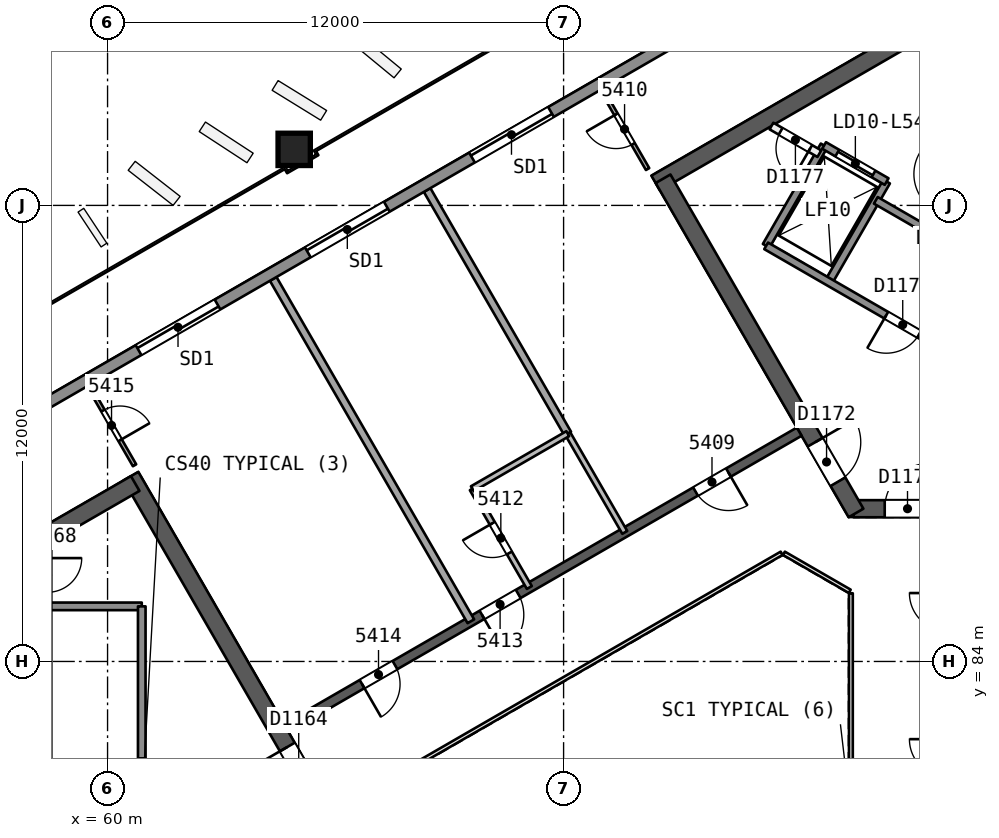
"""IFC4 building model, lengths in metres.
Left out: names, types, materials, properties, quantities, classifications, styles, units other than length and angle.
Written with IfcOpenShell. Run it as: python <this file> out.ifc"""

import sys

from ifc_helpers import new_model, si_unit, direction, frame, frame_2d, origin, origin_2d, place, context, subcontext, project, spatial, rectangle, extrude, element, fill, save


model = new_model("IFC4")
c1 = context("Model", 3, precision=1e-05, world=origin(), true_north=direction((0.0, 1.0)))
c2 = subcontext(c1, "Body", "Model", "MODEL_VIEW")
j1 = project(units=[si_unit("LENGTHUNIT", "METRE"), si_unit("PLANEANGLEUNIT", "RADIAN")], contexts=[c1])
p1 = place(None, origin())
s1 = spatial("IfcSite", under=j1, at=p1, CompositionType="ELEMENT")
p2 = place(p1, origin())
s2 = spatial("IfcBuilding", under=s1, at=p2, CompositionType="ELEMENT")
p3 = place(p2, frame((0.0, 0.0, 220.6)))
s3 = spatial("IfcBuildingStorey", under=s2, at=p3, CompositionType="ELEMENT", Elevation=220.6)
p4 = place(p3, frame((65.74, 80.0, 0.0), z_axis=(0.0, 0.0, 1.0), x_axis=(-0.499991857942, 0.866030104553, 0.0)))
e1 = element("IfcWall", 1, at=p4, inside=s3, PredefinedType="SHEAR", context=c2, shape_type="SweptSolid", body=[
    extrude(rectangle(XDim=10.25, YDim=0.45, at=frame_2d((5.125, 0.0))), origin(), (0.0, 0.0, 1.0), 3.7),
])
p5 = place(p4, frame((0.82, 0.0, 0.0)))
e2 = element("IfcOpeningElement", 2, at=p5, cuts=e1, PredefinedType="OPENING", context=c2, shape_type="SweptSolid", body=[
    extrude(rectangle(XDim=1.2, YDim=2.1, at=frame_2d((0.6, 1.05))), frame((0.0, 0.235, 0.0), z_axis=(0.0, -1.0, 0.0), x_axis=(1.0, 0.0, 0.0)), (0.0, 0.0, 1.0), 0.471),
])
p6 = place(p3, frame((60.728, 88.682, 0.0), z_axis=(0.0, 0.0, 1.0), x_axis=(-0.866021613849, -0.500006564303, 0.0)))
e3 = element("IfcWall", 3, at=p6, inside=s3, PredefinedType="SHEAR", context=c2, shape_type="SweptSolid", body=[
    extrude(rectangle(XDim=14.108, YDim=0.45, at=frame_2d((7.054, 0.0))), origin(), (0.0, 0.0, 1.0), 3.7),
])
p7 = place(p3, frame((79.63, 88.019, 0.0), z_axis=(0.0, 0.0, 1.0), x_axis=(1.0, 0.0, 0.0)))
e4 = element("IfcWall", 4, at=p7, inside=s3, PredefinedType="SHEAR", context=c2, shape_type="SweptSolid", body=[
    extrude(rectangle(XDim=10.25, YDim=0.45, at=frame_2d((5.125, 0.0))), origin(), (0.0, 0.0, 1.0), 3.7),
])
p8 = place(p7, frame((0.82, 0.0, 0.0)))
e5 = element("IfcOpeningElement", 5, at=p8, cuts=e4, PredefinedType="OPENING", context=c2, shape_type="SweptSolid", body=[
    extrude(rectangle(XDim=1.2, YDim=2.1, at=frame_2d((0.6, 1.05))), frame((0.0, 0.235, 0.0), z_axis=(0.0, -1.0, 0.0), x_axis=(1.0, 0.0, 0.0)), (0.0, 0.0, 1.0), 0.471),
])
p9 = place(p3, frame((86.723, 103.69, 0.0), z_axis=(0.0, 0.0, 1.0), x_axis=(-0.866022713978, -0.500004658852, 0.0)))
e6 = element("IfcWall", 6, at=p9, inside=s3, PredefinedType="SHEAR", context=c2, shape_type="SweptSolid", body=[
    extrude(rectangle(XDim=14.203, YDim=0.45, at=frame_2d((7.102, 0.0))), origin(), (0.0, 0.0, 1.0), 3.7),
])
p10 = place(p3, frame((74.617, 96.701, 0.0), z_axis=(0.0, 0.0, 1.0), x_axis=(0.499994385119, -0.866028645513, 0.0)))
e7 = element("IfcWall", 7, at=p10, inside=s3, PredefinedType="SHEAR", context=c2, shape_type="SweptSolid", body=[
    extrude(rectangle(XDim=10.155, YDim=0.45, at=frame_2d((5.077, 0.0))), origin(), (0.0, 0.0, 1.0), 3.7),
])
p11 = place(p10, frame((8.005, 0.0, 0.0)))
e8 = element("IfcOpeningElement", 8, at=p11, cuts=e7, PredefinedType="OPENING", context=c2, shape_type="SweptSolid", body=[
    extrude(rectangle(XDim=1.2, YDim=2.1, at=frame_2d((0.6, 1.05))), frame((0.0, 0.235, 0.0), z_axis=(0.0, -1.0, 0.0), x_axis=(1.0, 0.0, 0.0)), (0.0, 0.0, 1.0), 0.471),
])
p12 = place(p3, frame((78.2, 90.046, 0.0), z_axis=(0.0, 0.0, 1.0), x_axis=(-0.866026492143, -0.499998114903, 0.0)))
e9 = element("IfcWall", 9, at=p12, inside=s3, PredefinedType="SHEAR", context=c2, shape_type="SweptSolid", body=[
    extrude(rectangle(XDim=15.588, YDim=0.25, at=frame_2d((7.794, 0.0))), origin(), (0.0, 0.0, 1.0), 3.3),
])
p13 = place(p12, frame((2.15, 0.0, 0.0)))
e10 = element("IfcOpeningElement", 10, at=p13, cuts=e9, PredefinedType="OPENING", context=c2, shape_type="SweptSolid", body=[
    extrude(rectangle(XDim=1.0, YDim=2.1, at=frame_2d((0.5, 1.05))), frame((0.0, 0.135, 0.0), z_axis=(0.0, -1.0, 0.0), x_axis=(1.0, 0.0, 0.0)), (0.0, 0.0, 1.0), 0.271),
])
p14 = place(p12, frame((8.538, 0.0, 0.0)))
e11 = element("IfcOpeningElement", 11, at=p14, cuts=e9, PredefinedType="OPENING", context=c2, shape_type="SweptSolid", body=[
    extrude(rectangle(XDim=1.1, YDim=2.1, at=frame_2d((0.55, 1.05))), frame((0.0, 0.135, 0.0), z_axis=(0.0, -1.0, 0.0), x_axis=(1.0, 0.0, 0.0)), (0.0, 0.0, 1.0), 0.271),
])
p15 = place(p12, frame((12.282, 0.0, 0.0)))
e12 = element("IfcOpeningElement", 12, at=p15, cuts=e9, PredefinedType="OPENING", context=c2, shape_type="SweptSolid", body=[
    extrude(rectangle(XDim=1.0, YDim=2.1, at=frame_2d((0.5, 1.05))), frame((0.0, 0.135, 0.0), z_axis=(0.0, -1.0, 0.0), x_axis=(1.0, 0.0, 0.0)), (0.0, 0.0, 1.0), 0.271),
])
p16 = place(p3, frame((64.899, 97.495, 0.0), z_axis=(0.010093620709, -0.017482414954, 0.999796221231), x_axis=(-0.499897086036, 0.865849517735, 0.020187025824)))
e13 = element("IfcColumn", 13, at=p16, inside=s3, PredefinedType="COLUMN", context=c2, shape_type="SweptSolid", body=[
    extrude(rectangle(XDim=0.85, YDim=0.85, at=origin_2d()), origin(), (0.0, 0.0, 1.0), 3.701),
])
p17 = place(p3, frame((74.21, 96.956, 0.0), z_axis=(0.0, 0.0, 1.0), x_axis=(-0.49995203611, 0.866053093978, 0.0)))
e14 = element("IfcWall", 14, at=p17, inside=s3, PredefinedType="PARTITIONING", context=c2, shape_type="SweptSolid", body=[
    extrude(rectangle(XDim=2.424, YDim=0.1, at=frame_2d((1.212, 0.0))), origin(), (0.0, 0.0, 1.0), 3.3),
])
p18 = place(p17, frame((0.762, 0.0, 0.0)))
e15 = element("IfcOpeningElement", 15, at=p18, cuts=e14, PredefinedType="OPENING", context=c2, shape_type="SweptSolid", body=[
    extrude(rectangle(XDim=0.9, YDim=2.1, at=frame_2d((0.45, 1.05))), frame((0.0, 0.061, 0.0), z_axis=(0.0, -1.0, 0.0), x_axis=(1.0, 0.0, 0.0)), (0.0, 0.0, 1.0), 0.121),
])
p19 = place(p3, frame((68.408, 96.405, 0.0), z_axis=(0.0, 0.0, 1.0), x_axis=(0.500019340035, -0.866014237522, 0.0)))
e16 = element("IfcWall", 16, at=p19, inside=s3, PredefinedType="PARTITIONING", context=c2, shape_type="SweptSolid", body=[
    extrude(rectangle(XDim=7.403, YDim=0.2, at=frame_2d((3.702, 0.0))), origin(), (0.0, 0.0, 1.0), 3.3),
])
p20 = place(p3, frame((72.11, 89.994, 0.0), z_axis=(0.0, 0.0, 1.0), x_axis=(0.499990139034, -0.866031096941, 0.0)))
e17 = element("IfcWall", 17, at=p20, inside=s3, PredefinedType="PARTITIONING", context=c2, shape_type="SweptSolid", body=[
    extrude(rectangle(XDim=3.0, YDim=0.15, at=frame_2d((1.5, 0.0))), origin(), (0.0, 0.0, 1.0), 3.3),
])
p21 = place(p3, frame((71.099, 85.946, 0.0), z_axis=(0.0, 0.0, 1.0), x_axis=(-0.499990139034, 0.866031096941, 0.0)))
e18 = element("IfcWall", 18, at=p21, inside=s3, PredefinedType="PARTITIONING", context=c2, shape_type="SweptSolid", body=[
    extrude(rectangle(XDim=3.0, YDim=0.15, at=frame_2d((1.5, 0.0))), origin(), (0.0, 0.0, 1.0), 3.3),
])
p22 = place(p21, frame((1.05, 0.0, 0.0)))
e19 = element("IfcOpeningElement", 19, at=p22, cuts=e18, PredefinedType="OPENING", context=c2, shape_type="SweptSolid", body=[
    extrude(rectangle(XDim=0.9, YDim=2.1, at=frame_2d((0.45, 1.05))), frame((0.0, 0.085, 0.0), z_axis=(0.0, -1.0, 0.0), x_axis=(1.0, 0.0, 0.0)), (0.0, 0.0, 1.0), 0.171),
])
p23 = place(p3, frame((69.599, 88.544, 0.0), z_axis=(0.0, 0.0, 1.0), x_axis=(0.866032775405, 0.499987231761, 0.0)))
e20 = element("IfcWall", 20, at=p23, inside=s3, PredefinedType="PARTITIONING", context=c2, shape_type="SweptSolid", body=[
    extrude(rectangle(XDim=2.9, YDim=0.15, at=frame_2d((1.45, 0.0))), origin(), (0.0, 0.0, 1.0), 3.3),
])
p24 = place(p3, frame((64.358, 94.067, 0.0), z_axis=(0.0, 0.0, 1.0), x_axis=(0.500010919066, -0.866019099567, 0.0)))
e21 = element("IfcWall", 21, at=p24, inside=s3, PredefinedType="PARTITIONING", context=c2, shape_type="SweptSolid", body=[
    extrude(rectangle(XDim=10.403, YDim=0.2, at=frame_2d((5.202, 0.0))), origin(), (0.0, 0.0, 1.0), 3.3),
])
p25 = place(p3, frame((59.499, 91.261, 0.0), z_axis=(0.0, 0.0, 1.0), x_axis=(0.49995203611, -0.866053093978, 0.0)))
e22 = element("IfcWall", 22, at=p25, inside=s3, PredefinedType="PARTITIONING", context=c2, shape_type="SweptSolid", body=[
    extrude(rectangle(XDim=2.424, YDim=0.1, at=frame_2d((1.212, 0.0))), origin(), (0.0, 0.0, 1.0), 3.3),
])
p26 = place(p25, frame((0.762, 0.0, 0.0)))
e23 = element("IfcOpeningElement", 23, at=p26, cuts=e22, PredefinedType="OPENING", context=c2, shape_type="SweptSolid", body=[
    extrude(rectangle(XDim=0.9, YDim=2.1, at=frame_2d((0.45, 1.05))), frame((0.0, 0.061, 0.0), z_axis=(0.0, -1.0, 0.0), x_axis=(1.0, 0.0, 0.0)), (0.0, 0.0, 1.0), 0.121),
])
p27 = place(p3, frame((44.193, 82.596, 0.0), z_axis=(0.0, 0.0, 1.0), x_axis=(0.866024521231, 0.500001528624, 0.0)))
e24 = element("IfcWall", 24, at=p27, inside=s3, PredefinedType="SOLIDWALL", context=c2, shape_type="SweptSolid", body=[
    extrude(rectangle(XDim=50.762, YDim=0.3, at=frame_2d((25.381, 0.0))), origin(), (0.0, 0.0, 1.0), 3.3),
])
p28 = place(p27, frame((24.337, 0.0, 0.0)))
e25 = element("IfcOpeningElement", 25, at=p28, cuts=e24, PredefinedType="OPENING", context=c2, shape_type="SweptSolid", body=[
    extrude(rectangle(XDim=2.4, YDim=2.4, at=frame_2d((1.2, 1.2))), frame((0.0, 0.161, 0.0), z_axis=(0.0, -1.0, 0.0), x_axis=(1.0, 0.0, 0.0)), (0.0, 0.0, 1.0), 0.321),
])
p29 = place(p27, frame((29.325, 0.0, 0.0)))
e26 = element("IfcOpeningElement", 26, at=p29, cuts=e24, PredefinedType="OPENING", context=c2, shape_type="SweptSolid", body=[
    extrude(rectangle(XDim=2.4, YDim=2.4, at=frame_2d((1.2, 1.2))), frame((0.0, 0.161, 0.0), z_axis=(0.0, -1.0, 0.0), x_axis=(1.0, 0.0, 0.0)), (0.0, 0.0, 1.0), 0.321),
])
p30 = place(p27, frame((39.492, 0.0, 0.0)))
e27 = element("IfcOpeningElement", 27, at=p30, cuts=e24, PredefinedType="OPENING", context=c2, shape_type="SweptSolid", body=[
    extrude(rectangle(XDim=2.4, YDim=2.4, at=frame_2d((1.2, 1.2))), frame((0.0, 0.161, 0.0), z_axis=(0.0, -1.0, 0.0), x_axis=(1.0, 0.0, 0.0)), (0.0, 0.0, 1.0), 0.321),
])
p31 = place(p27, frame((19.193, 0.0, 0.0)))
e28 = element("IfcOpeningElement", 28, at=p31, cuts=e24, PredefinedType="OPENING", context=c2, shape_type="SweptSolid", body=[
    extrude(rectangle(XDim=2.4, YDim=2.4, at=frame_2d((1.2, 1.2))), frame((0.0, 0.161, 0.0), z_axis=(0.0, -1.0, 0.0), x_axis=(1.0, 0.0, 0.0)), (0.0, 0.0, 1.0), 0.321),
])
p32 = place(p27, frame((8.878, 0.0, 0.0)))
e29 = element("IfcOpeningElement", 29, at=p32, cuts=e24, PredefinedType="OPENING", context=c2, shape_type="SweptSolid", body=[
    extrude(rectangle(XDim=2.4, YDim=2.4, at=frame_2d((1.2, 1.2))), frame((0.0, 0.161, 0.0), z_axis=(0.0, -1.0, 0.0), x_axis=(1.0, 0.0, 0.0)), (0.0, 0.0, 1.0), 0.321),
])
p33 = place(p3, frame((60.9, 85.45, 0.0), z_axis=(0.0, 0.0, 1.0), x_axis=(-1.0, 0.0, 0.0)))
e30 = element("IfcWall", 30, at=p33, inside=s3, PredefinedType="SOLIDWALL", context=c2, shape_type="SweptSolid", body=[
    extrude(rectangle(XDim=2.48, YDim=0.2, at=frame_2d((1.24, 0.0))), origin(), (0.0, 0.0, 1.0), 3.3),
])
p34 = place(p3, frame((60.9, 85.45, 0.0), z_axis=(0.0, 0.0, 1.0), x_axis=(0.0, -1.0, 0.0)))
e31 = element("IfcWall", 31, at=p34, inside=s3, PredefinedType="SOLIDWALL", context=c2, shape_type="SweptSolid", body=[
    extrude(rectangle(XDim=10.9, YDim=0.2, at=frame_2d((5.45, 0.0))), origin(), (0.0, 0.0, 1.0), 3.3),
])
p35 = place(p34, frame((4.0, 0.0, 0.0)))
e32 = element("IfcOpeningElement", 32, at=p35, cuts=e31, PredefinedType="OPENING", context=c2, shape_type="SweptSolid", body=[
    extrude(rectangle(XDim=1.0, YDim=2.1, at=frame_2d((0.5, 1.05))), frame((0.0, 0.11, 0.0), z_axis=(0.0, -1.0, 0.0), x_axis=(1.0, 0.0, 0.0)), (0.0, 0.0, 1.0), 0.221),
])
for number, where, z_axis, x_axis in (
    (33, (78.976, 93.986, 0.0), (0.0, 0.0, 1.0), (0.5, 0.866, 0.0)),
    (34, (77.33, 94.936, 0.0), (0.0, 0.0, 1.0), (0.5, 0.866, 0.0)),
):
    element("IfcWall", number, at=place(p3, frame(where, z_axis=z_axis, x_axis=x_axis)), inside=s3, PredefinedType="SOLIDWALL", context=c2, shape_type="SweptSolid", body=[
        extrude(rectangle(XDim=3.05, YDim=0.2, at=frame_2d((1.525, 0.0))), origin(), (0.0, 0.0, 1.0), 3.3),
    ])
p36 = place(p3, frame((86.77, 89.486, 0.0), z_axis=(0.0, 0.0, 1.0), x_axis=(-0.86601811187, 0.500012629753, 0.0)))
e35 = element("IfcWall", 35, at=p36, inside=s3, PredefinedType="SOLIDWALL", context=c2, shape_type="SweptSolid", body=[
    extrude(rectangle(XDim=10.9, YDim=0.2, at=frame_2d((5.45, 0.0))), origin(), (0.0, 0.0, 1.0), 3.3),
])
p37 = place(p36, frame((0.625, 0.0, 0.0)))
e36 = element("IfcOpeningElement", 36, at=p37, cuts=e35, PredefinedType="OPENING", context=c2, shape_type="SweptSolid", body=[
    extrude(rectangle(XDim=1.0, YDim=2.1, at=frame_2d((0.5, 1.05))), frame((0.0, 0.11, 0.0), z_axis=(0.0, -1.0, 0.0), x_axis=(1.0, 0.0, 0.0)), (0.0, 0.0, 1.0), 0.221),
])
p38 = place(p36, frame((2.875, 0.0, 0.0)))
e37 = element("IfcOpeningElement", 37, at=p38, cuts=e35, PredefinedType="OPENING", context=c2, shape_type="SweptSolid", body=[
    extrude(rectangle(XDim=1.0, YDim=2.1, at=frame_2d((0.5, 1.05))), frame((0.0, 0.11, 0.0), z_axis=(0.0, -1.0, 0.0), x_axis=(1.0, 0.0, 0.0)), (0.0, 0.0, 1.0), 0.221),
])
p39 = place(p36, frame((6.25, 0.0, 0.0)))
e38 = element("IfcOpeningElement", 38, at=p39, cuts=e35, PredefinedType="OPENING", context=c2, shape_type="SweptSolid", body=[
    extrude(rectangle(XDim=1.0, YDim=2.1, at=frame_2d((0.5, 1.05))), frame((0.0, 0.11, 0.0), z_axis=(0.0, -1.0, 0.0), x_axis=(1.0, 0.0, 0.0)), (0.0, 0.0, 1.0), 0.221),
])
p40 = place(p3, frame((89.43, 90.814, 0.0), z_axis=(0.0, 0.0, 1.0), x_axis=(-0.866018983788, 0.500011119594, 0.0)))
e39 = element("IfcWall", 39, at=p40, inside=s3, PredefinedType="SOLIDWALL", context=c2, shape_type="SweptSolid", body=[
    extrude(rectangle(XDim=10.64, YDim=0.2, at=frame_2d((5.32, 0.0))), origin(), (0.0, 0.0, 1.0), 3.3),
])
p41 = place(p40, frame((0.37, 0.0, 0.0)))
e40 = element("IfcOpeningElement", 40, at=p41, cuts=e39, PredefinedType="OPENING", context=c2, shape_type="SweptSolid", body=[
    extrude(rectangle(XDim=0.9, YDim=2.1, at=frame_2d((0.45, 1.05))), frame((0.0, 0.11, 0.0), z_axis=(0.0, -1.0, 0.0), x_axis=(1.0, 0.0, 0.0)), (0.0, 0.0, 1.0), 0.221),
])
p42 = place(p3, frame((78.73, 97.361, 0.0), z_axis=(0.0, 0.0, 1.0), x_axis=(-0.866045896294, 0.499964504253, 0.0)))
e41 = element("IfcWall", 41, at=p42, inside=s3, PredefinedType="PARTITIONING", context=c2, shape_type="SweptSolid", body=[
    extrude(rectangle(XDim=1.455, YDim=0.2, at=frame_2d((0.728, 0.0))), origin(), (0.0, 0.0, 1.0), 3.3),
])
p43 = place(p42, frame((0.278, 0.0, 0.0)))
e42 = element("IfcOpeningElement", 42, at=p43, cuts=e41, PredefinedType="OPENING", context=c2, shape_type="SweptSolid", body=[
    extrude(rectangle(XDim=0.9, YDim=2.1, at=frame_2d((0.45, 1.05))), frame((0.0, 0.11, 0.0), z_axis=(0.0, -1.0, 0.0), x_axis=(1.0, 0.0, 0.0)), (0.0, 0.0, 1.0), 0.221),
])
p44 = place(p3, frame((80.5, 96.627, 0.0), z_axis=(0.0, 0.0, 1.0), x_axis=(-0.86601224135, 0.500022797313, 0.0)))
e43 = element("IfcWall", 43, at=p44, inside=s3, PredefinedType="SOLIDWALL", context=c2, shape_type="SweptSolid", body=[
    extrude(rectangle(XDim=1.9, YDim=0.2, at=frame_2d((0.95, 0.0))), origin(), (0.0, 0.0, 1.0), 3.3),
])
p45 = place(p44, frame((0.4, 0.0, 0.0)))
e44 = element("IfcOpeningElement", 44, at=p45, cuts=e43, PredefinedType="OPENING", context=c2, shape_type="SweptSolid", body=[
    extrude(rectangle(XDim=1.1, YDim=2.1, at=frame_2d((0.55, 1.05))), frame((0.0, 0.11, 0.0), z_axis=(0.0, -1.0, 0.0), x_axis=(1.0, 0.0, 0.0)), (0.0, 0.0, 1.0), 0.221),
])
p46 = place(p3, frame((79.56, 74.206, 0.0), z_axis=(0.0, 0.0, 1.0), x_axis=(0.0, 1.0, 0.0)))
e45 = element("IfcWall", 45, at=p46, inside=s3, PredefinedType="PARTITIONING", context=c2, shape_type="SweptSolid", body=[
    extrude(rectangle(XDim=11.588, YDim=0.1, at=frame_2d((5.794, 0.0))), origin(), (0.0, 0.0, 1.0), 3.3),
])
p47 = place(p3, frame((79.53, 85.846, 0.0), z_axis=(0.0, 0.0, 1.0), x_axis=(-0.866041268327, 0.499972520799, 0.0)))
e46 = element("IfcWall", 46, at=p47, inside=s3, PredefinedType="PARTITIONING", context=c2, shape_type="SweptSolid", body=[
    extrude(rectangle(XDim=2.0, YDim=0.1, at=frame_2d((1.0, 0.0))), origin(), (0.0, 0.0, 1.0), 3.3),
])
p48 = place(p3, frame((77.738, 86.846, 0.0), z_axis=(0.0, 0.0, 1.0), x_axis=(-0.866026658274, -0.499997827154, 0.0)))
e47 = element("IfcWall", 47, at=p48, inside=s3, PredefinedType="PARTITIONING", context=c2, shape_type="SweptSolid", body=[
    extrude(rectangle(XDim=11.588, YDim=0.1, at=frame_2d((5.794, 0.0))), origin(), (0.0, 0.0, 1.0), 3.3),
])
p49 = place(p13, origin())
e48 = element("IfcDoor", 48, at=p49, inside=s3, OperationType="SINGLE_SWING_LEFT", PredefinedType="NOTDEFINED", context=c2, shape_type="SweptSolid", body=[
    extrude(rectangle(XDim=1.0, YDim=2.1, at=frame_2d((0.5, 1.05))), frame((0.0, 0.025, 0.0), z_axis=(0.0, -1.0, 0.0), x_axis=(1.0, 0.0, 0.0)), (0.0, 0.0, 1.0), 0.05),
])
fill(e10, e48)
p50 = place(p18, origin())
e49 = element("IfcDoor", 49, at=p50, inside=s3, OperationType="SINGLE_SWING_RIGHT", PredefinedType="NOTDEFINED", context=c2, shape_type="SweptSolid", body=[
    extrude(rectangle(XDim=0.9, YDim=2.1, at=frame_2d((0.45, 1.05))), frame((0.0, 0.025, 0.0), z_axis=(0.0, -1.0, 0.0), x_axis=(1.0, 0.0, 0.0)), (0.0, 0.0, 1.0), 0.05),
])
fill(e15, e49)
p51 = place(p22, origin())
e50 = element("IfcDoor", 50, at=p51, inside=s3, OperationType="SINGLE_SWING_RIGHT", PredefinedType="NOTDEFINED", context=c2, shape_type="SweptSolid", body=[
    extrude(rectangle(XDim=0.9, YDim=2.1, at=frame_2d((0.45, 1.05))), frame((0.0, 0.025, 0.0), z_axis=(0.0, -1.0, 0.0), x_axis=(1.0, 0.0, 0.0)), (0.0, 0.0, 1.0), 0.05),
])
fill(e19, e50)
p52 = place(p14, origin())
e51 = element("IfcDoor", 51, at=p52, inside=s3, OperationType="SINGLE_SWING_RIGHT", PredefinedType="NOTDEFINED", context=c2, shape_type="SweptSolid", body=[
    extrude(rectangle(XDim=1.1, YDim=2.1, at=frame_2d((0.55, 1.05))), frame((0.0, 0.025, 0.0), z_axis=(0.0, -1.0, 0.0), x_axis=(1.0, 0.0, 0.0)), (0.0, 0.0, 1.0), 0.05),
])
fill(e11, e51)
p53 = place(p15, origin())
e52 = element("IfcDoor", 52, at=p53, inside=s3, OperationType="SINGLE_SWING_RIGHT", PredefinedType="NOTDEFINED", context=c2, shape_type="SweptSolid", body=[
    extrude(rectangle(XDim=1.0, YDim=2.1, at=frame_2d((0.5, 1.05))), frame((0.0, 0.025, 0.0), z_axis=(0.0, -1.0, 0.0), x_axis=(1.0, 0.0, 0.0)), (0.0, 0.0, 1.0), 0.05),
])
fill(e12, e52)
p54 = place(p26, origin())
e53 = element("IfcDoor", 53, at=p54, inside=s3, OperationType="SINGLE_SWING_RIGHT", PredefinedType="NOTDEFINED", context=c2, shape_type="SweptSolid", body=[
    extrude(rectangle(XDim=0.9, YDim=2.1, at=frame_2d((0.45, 1.05))), frame((0.0, 0.025, 0.0), z_axis=(0.0, -1.0, 0.0), x_axis=(1.0, 0.0, 0.0)), (0.0, 0.0, 1.0), 0.05),
])
fill(e23, e53)
p55 = place(p28, origin())
e54 = element("IfcDoor", 54, at=p55, inside=s3, OperationType="SLIDING_TO_LEFT", PredefinedType="NOTDEFINED", context=c2, shape_type="SweptSolid", body=[
    extrude(rectangle(XDim=2.4, YDim=2.4, at=frame_2d((1.2, 1.2))), frame((0.0, 0.025, 0.0), z_axis=(0.0, -1.0, 0.0), x_axis=(1.0, 0.0, 0.0)), (0.0, 0.0, 1.0), 0.05),
])
fill(e25, e54)
p56 = place(p29, origin())
e55 = element("IfcDoor", 55, at=p56, inside=s3, OperationType="SLIDING_TO_RIGHT", PredefinedType="NOTDEFINED", context=c2, shape_type="SweptSolid", body=[
    extrude(rectangle(XDim=2.4, YDim=2.4, at=frame_2d((1.2, 1.2))), frame((0.0, 0.025, 0.0), z_axis=(0.0, -1.0, 0.0), x_axis=(1.0, 0.0, 0.0)), (0.0, 0.0, 1.0), 0.05),
])
fill(e26, e55)
p57 = place(p31, origin())
e56 = element("IfcDoor", 56, at=p57, inside=s3, OperationType="SLIDING_TO_RIGHT", PredefinedType="NOTDEFINED", context=c2, shape_type="SweptSolid", body=[
    extrude(rectangle(XDim=2.4, YDim=2.4, at=frame_2d((1.2, 1.2))), frame((0.0, 0.025, 0.0), z_axis=(0.0, -1.0, 0.0), x_axis=(1.0, 0.0, 0.0)), (0.0, 0.0, 1.0), 0.05),
])
fill(e28, e56)
p58 = place(p5, origin())
e57 = element("IfcDoor", 57, at=p58, inside=s3, OperationType="SINGLE_SWING_RIGHT", PredefinedType="NOTDEFINED", context=c2, shape_type="SweptSolid", body=[
    extrude(rectangle(XDim=1.2, YDim=2.1, at=frame_2d((0.6, 1.05))), frame((0.0, 0.025, 0.0), z_axis=(0.0, -1.0, 0.0), x_axis=(1.0, 0.0, 0.0)), (0.0, 0.0, 1.0), 0.05),
])
fill(e2, e57)
p59 = place(p8, origin())
e58 = element("IfcDoor", 58, at=p59, inside=s3, OperationType="SINGLE_SWING_RIGHT", PredefinedType="NOTDEFINED", context=c2, shape_type="SweptSolid", body=[
    extrude(rectangle(XDim=1.2, YDim=2.1, at=frame_2d((0.6, 1.05))), frame((0.0, 0.025, 0.0), z_axis=(0.0, -1.0, 0.0), x_axis=(1.0, 0.0, 0.0)), (0.0, 0.0, 1.0), 0.05),
])
fill(e5, e58)
p60 = place(p11, origin())
e59 = element("IfcDoor", 59, at=p60, inside=s3, OperationType="SINGLE_SWING_LEFT", PredefinedType="NOTDEFINED", context=c2, shape_type="SweptSolid", body=[
    extrude(rectangle(XDim=1.2, YDim=2.1, at=frame_2d((0.6, 1.05))), frame((0.0, 0.025, 0.0), z_axis=(0.0, -1.0, 0.0), x_axis=(1.0, 0.0, 0.0)), (0.0, 0.0, 1.0), 0.05),
])
fill(e8, e59)
p61 = place(p45, origin())
e60 = element("IfcDoor", 60, at=p61, inside=s3, OperationType="SLIDING_TO_RIGHT", PredefinedType="NOTDEFINED", context=c2, shape_type="SweptSolid", body=[
    extrude(rectangle(XDim=1.1, YDim=2.1, at=frame_2d((0.55, 1.05))), frame((0.0, 0.025, 0.0), z_axis=(0.0, -1.0, 0.0), x_axis=(1.0, 0.0, 0.0)), (0.0, 0.0, 1.0), 0.05),
])
fill(e44, e60)
p62 = place(p39, origin())
e61 = element("IfcDoor", 61, at=p62, inside=s3, OperationType="SINGLE_SWING_RIGHT", PredefinedType="NOTDEFINED", context=c2, shape_type="SweptSolid", body=[
    extrude(rectangle(XDim=1.0, YDim=2.1, at=frame_2d((0.5, 1.05))), frame((0.0, 0.025, 0.0), z_axis=(0.0, -1.0, 0.0), x_axis=(1.0, 0.0, 0.0)), (0.0, 0.0, 1.0), 0.05),
])
fill(e38, e61)
p63 = place(p43, origin())
e62 = element("IfcDoor", 62, at=p63, inside=s3, OperationType="SINGLE_SWING_LEFT", PredefinedType="NOTDEFINED", context=c2, shape_type="SweptSolid", body=[
    extrude(rectangle(XDim=0.9, YDim=2.1, at=frame_2d((0.45, 1.05))), frame((0.0, 0.025, 0.0), z_axis=(0.0, -1.0, 0.0), x_axis=(1.0, 0.0, 0.0)), (0.0, 0.0, 1.0), 0.05),
])
fill(e42, e62)
save(model, sys.argv[1])
